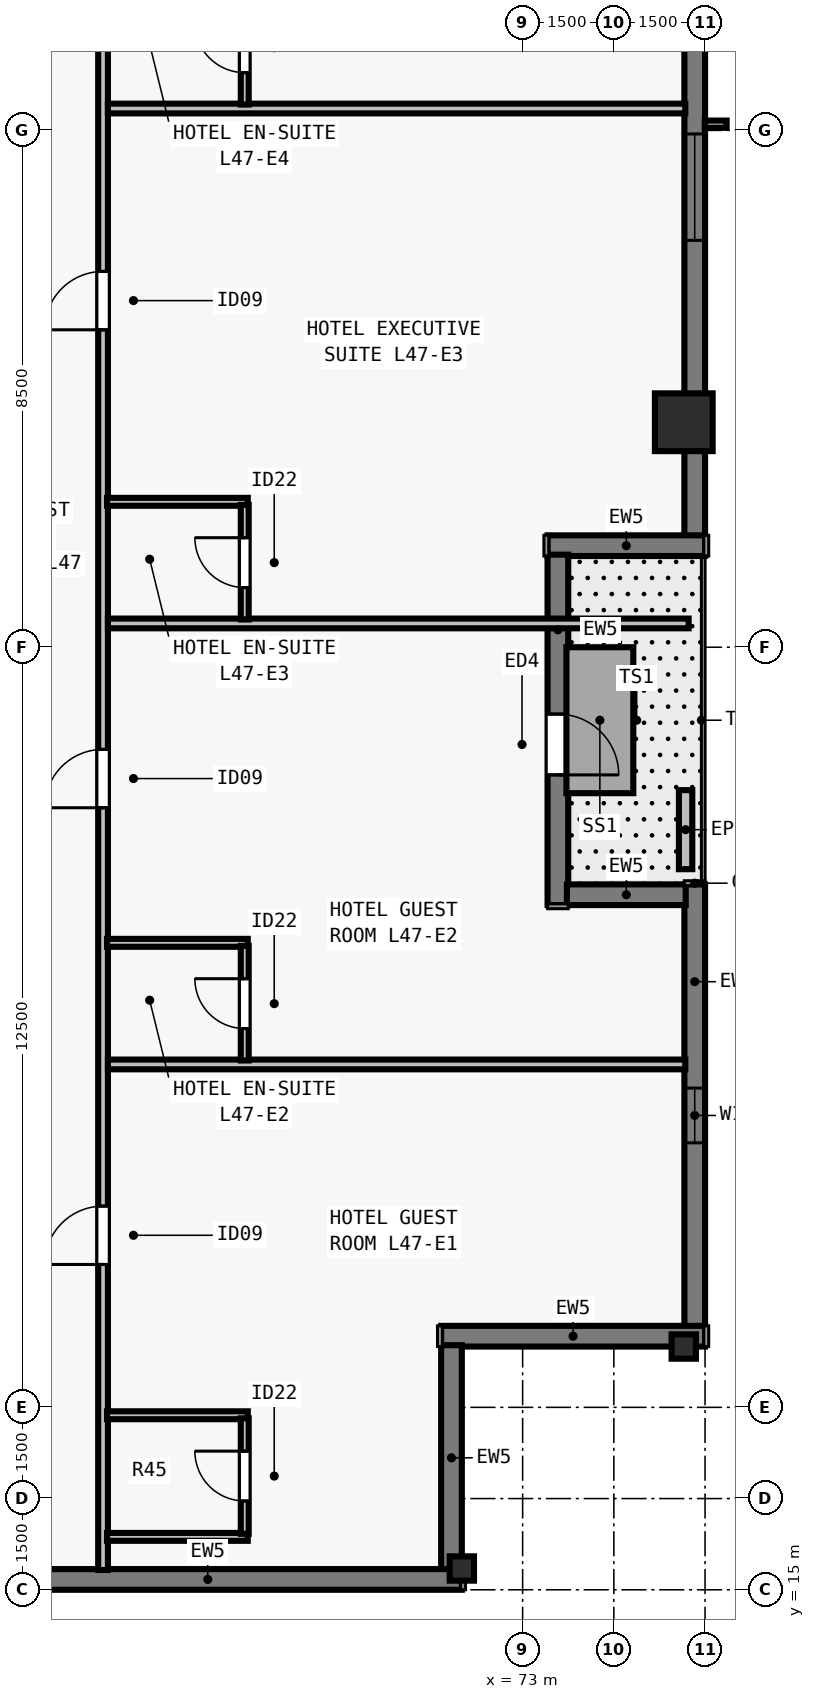
"""IFC4 building model, lengths in metres.
Left out: names, types, materials, properties, quantities, classifications, styles, units other than length and angle.
Written with IfcOpenShell. Run it as: python <this file> out.ifc"""

import sys

from ifc_helpers import new_model, si_unit, direction, frame, frame_2d, origin, origin_2d, place, context, subcontext, project, spatial, rectangle, i_section, extrude, element, fill, save


model = new_model("IFC4")
c1 = context("Model", 3, precision=1e-05, world=origin(), true_north=direction((0.0, 1.0)))
c2 = subcontext(c1, "Body", "Model", "MODEL_VIEW")
j1 = project(units=[si_unit("LENGTHUNIT", "METRE"), si_unit("PLANEANGLEUNIT", "RADIAN")], contexts=[c1])
p1 = place(None, origin())
s1 = spatial("IfcSite", under=j1, at=p1, CompositionType="ELEMENT")
p2 = place(p1, origin())
s2 = spatial("IfcBuilding", under=s1, at=p2, CompositionType="ELEMENT")
p3 = place(p2, frame((0.0, 0.0, 172.5)))
s3 = spatial("IfcBuildingStorey", under=s2, at=p3, CompositionType="ELEMENT", Elevation=172.5)
for number, where, z_axis, x_axis in (
    (1, (72.0, 15.35, 0.0), (0.0, 0.0, 1.0), (1.0, 0.0, 0.0)),
    (2, (75.65, 19.0, 0.0), (0.0, 0.0, 1.0), (0.0, 1.0, 0.0)),
):
    element("IfcColumn", number, at=place(p3, frame(where, z_axis=z_axis, x_axis=x_axis)), inside=s3, PredefinedType="COLUMN", context=c2, shape_type="SweptSolid", body=[
        extrude(i_section(OverallWidth=0.4, OverallDepth=0.4, WebThickness=0.022, FlangeThickness=0.036, at=origin_2d()), origin(), (0.0, 0.0, 1.0), 3.5),
    ])
p4 = place(p3, frame((75.65, 34.2, 0.0), z_axis=(0.0, 0.0, 1.0), x_axis=(0.0, 1.0, 0.0)))
e3 = element("IfcColumn", 3, at=p4, inside=s3, PredefinedType="COLUMN", context=c2, shape_type="SweptSolid", body=[
    extrude(rectangle(XDim=0.95, YDim=0.95, at=origin_2d()), origin(), (0.0, 0.0, 1.0), 3.5),
])
p5 = place(p3, frame((75.83, 26.6, 0.0), z_axis=(0.0, 0.0, 1.0), x_axis=(0.0, -1.0, 0.0)))
e4 = element("IfcWall", 4, at=p5, inside=s3, PredefinedType="SOLIDWALL", context=c2, shape_type="SweptSolid", body=[
    extrude(rectangle(XDim=7.282, YDim=0.34, at=frame_2d((3.641, 0.0))), origin(), (0.0, 0.0, 1.0), 3.28),
])
p6 = place(p5, frame((3.35, 0.0, 0.8)))
e5 = element("IfcOpeningElement", 5, at=p6, cuts=e4, PredefinedType="OPENING", context=c2, shape_type="SweptSolid", body=[
    extrude(rectangle(XDim=0.9, YDim=1.66, at=frame_2d((0.45, 0.83))), frame((0.0, 0.18, 0.0), z_axis=(0.0, -1.0, 0.0), x_axis=(1.0, 0.0, 0.0)), (0.0, 0.0, 1.0), 0.36),
])
p7 = place(p3, frame((76.0, 19.17, 0.0), z_axis=(0.0, 0.0, 1.0), x_axis=(-1.0, 0.0, 0.0)))
e6 = element("IfcWall", 6, at=p7, inside=s3, PredefinedType="SOLIDWALL", context=c2, shape_type="SweptSolid", body=[
    extrude(rectangle(XDim=4.34, YDim=0.34, at=frame_2d((2.17, 0.0))), origin(), (0.0, 0.0, 1.0), 3.28),
])
p8 = place(p3, frame((71.83, 19.022, 0.0), z_axis=(0.0, 0.0, 1.0), x_axis=(0.0, -1.0, 0.0)))
e7 = element("IfcWall", 7, at=p8, inside=s3, PredefinedType="SOLIDWALL", context=c2, shape_type="SweptSolid", body=[
    extrude(rectangle(XDim=3.704, YDim=0.34, at=frame_2d((1.852, 0.0))), origin(), (0.0, 0.0, 1.0), 3.28),
])
p9 = place(p3, frame((72.0, 15.17, 0.0), z_axis=(0.0, 0.0, 1.0), x_axis=(-1.0, 0.0, 0.0)))
e8 = element("IfcWall", 8, at=p9, inside=s3, PredefinedType="SOLIDWALL", context=c2, shape_type="SweptSolid", body=[
    extrude(rectangle(XDim=39.682, YDim=0.34, at=frame_2d((19.841, 0.0))), origin(), (0.0, 0.0, 1.0), 3.28),
])
p10 = place(p9, frame((8.505, 0.0, 0.8)))
e9 = element("IfcOpeningElement", 9, at=p10, cuts=e8, PredefinedType="OPENING", context=c2, shape_type="SweptSolid", body=[
    extrude(rectangle(XDim=1.35, YDim=1.66, at=frame_2d((0.675, 0.83))), frame((0.0, 0.18, 0.0), z_axis=(0.0, -1.0, 0.0), x_axis=(1.0, 0.0, 0.0)), (0.0, 0.0, 1.0), 0.36),
])
p11 = place(p9, frame((11.859, 0.0, 0.8)))
e10 = element("IfcOpeningElement", 10, at=p11, cuts=e8, PredefinedType="OPENING", context=c2, shape_type="SweptSolid", body=[
    extrude(rectangle(XDim=1.75, YDim=1.66, at=frame_2d((0.875, 0.83))), frame((0.0, 0.18, 0.0), z_axis=(0.0, -1.0, 0.0), x_axis=(1.0, 0.0, 0.0)), (0.0, 0.0, 1.0), 0.36),
])
p12 = place(p9, frame((16.062, 0.0, 0.8)))
e11 = element("IfcOpeningElement", 11, at=p12, cuts=e8, PredefinedType="OPENING", context=c2, shape_type="SweptSolid", body=[
    extrude(rectangle(XDim=1.35, YDim=1.66, at=frame_2d((0.675, 0.83))), frame((0.0, 0.18, 0.0), z_axis=(0.0, -1.0, 0.0), x_axis=(1.0, 0.0, 0.0)), (0.0, 0.0, 1.0), 0.36),
])
p13 = place(p9, frame((18.966, 0.0, 0.8)))
e12 = element("IfcOpeningElement", 12, at=p13, cuts=e8, PredefinedType="OPENING", context=c2, shape_type="SweptSolid", body=[
    extrude(rectangle(XDim=1.75, YDim=1.66, at=frame_2d((0.875, 0.83))), frame((0.0, 0.18, 0.0), z_axis=(0.0, -1.0, 0.0), x_axis=(1.0, 0.0, 0.0)), (0.0, 0.0, 1.0), 0.36),
])
p14 = place(p9, frame((21.469, 0.0, 0.8)))
e13 = element("IfcOpeningElement", 13, at=p14, cuts=e8, PredefinedType="OPENING", context=c2, shape_type="SweptSolid", body=[
    extrude(rectangle(XDim=1.35, YDim=1.66, at=frame_2d((0.675, 0.83))), frame((0.0, 0.18, 0.0), z_axis=(0.0, -1.0, 0.0), x_axis=(1.0, 0.0, 0.0)), (0.0, 0.0, 1.0), 0.36),
])
p15 = place(p9, frame((26.073, 0.0, 0.8)))
e14 = element("IfcOpeningElement", 14, at=p15, cuts=e8, PredefinedType="OPENING", context=c2, shape_type="SweptSolid", body=[
    extrude(rectangle(XDim=1.75, YDim=1.66, at=frame_2d((0.875, 0.83))), frame((0.0, 0.18, 0.0), z_axis=(0.0, -1.0, 0.0), x_axis=(1.0, 0.0, 0.0)), (0.0, 0.0, 1.0), 0.36),
])
p16 = place(p9, frame((32.71, 0.0, 0.8)))
e15 = element("IfcOpeningElement", 15, at=p16, cuts=e8, PredefinedType="OPENING", context=c2, shape_type="SweptSolid", body=[
    extrude(rectangle(XDim=0.9, YDim=1.66, at=frame_2d((0.45, 0.83))), frame((0.0, 0.18, 0.0), z_axis=(0.0, -1.0, 0.0), x_axis=(1.0, 0.0, 0.0)), (0.0, 0.0, 1.0), 0.36),
])
p17 = place(p3, frame((75.83, 59.0, 0.0), z_axis=(0.0, 0.0, 1.0), x_axis=(0.0, -1.0, 0.0)))
e16 = element("IfcWall", 16, at=p17, inside=s3, PredefinedType="SOLIDWALL", context=c2, shape_type="SweptSolid", body=[
    extrude(rectangle(XDim=26.682, YDim=0.34, at=frame_2d((13.341, 0.0))), origin(), (0.0, 0.0, 1.0), 3.28),
])
p18 = place(p17, frame((4.873, 0.0, 0.8)))
e17 = element("IfcOpeningElement", 17, at=p18, cuts=e16, PredefinedType="OPENING", context=c2, shape_type="SweptSolid", body=[
    extrude(rectangle(XDim=1.75, YDim=1.66, at=frame_2d((0.875, 0.83))), frame((0.0, 0.18, 0.0), z_axis=(0.0, -1.0, 0.0), x_axis=(1.0, 0.0, 0.0)), (0.0, 0.0, 1.0), 0.36),
])
p19 = place(p17, frame((8.87, 0.0, 0.8)))
e18 = element("IfcOpeningElement", 18, at=p19, cuts=e16, PredefinedType="OPENING", context=c2, shape_type="SweptSolid", body=[
    extrude(rectangle(XDim=1.35, YDim=1.66, at=frame_2d((0.675, 0.83))), frame((0.0, 0.18, 0.0), z_axis=(0.0, -1.0, 0.0), x_axis=(1.0, 0.0, 0.0)), (0.0, 0.0, 1.0), 0.36),
])
p20 = place(p17, frame((16.462, 0.0, 0.8)))
e19 = element("IfcOpeningElement", 19, at=p20, cuts=e16, PredefinedType="OPENING", context=c2, shape_type="SweptSolid", body=[
    extrude(rectangle(XDim=1.35, YDim=1.66, at=frame_2d((0.675, 0.83))), frame((0.0, 0.18, 0.0), z_axis=(0.0, -1.0, 0.0), x_axis=(1.0, 0.0, 0.0)), (0.0, 0.0, 1.0), 0.36),
])
p21 = place(p17, frame((20.059, 0.0, 0.8)))
e20 = element("IfcOpeningElement", 20, at=p21, cuts=e16, PredefinedType="OPENING", context=c2, shape_type="SweptSolid", body=[
    extrude(rectangle(XDim=1.75, YDim=1.66, at=frame_2d((0.875, 0.83))), frame((0.0, 0.18, 0.0), z_axis=(0.0, -1.0, 0.0), x_axis=(1.0, 0.0, 0.0)), (0.0, 0.0, 1.0), 0.36),
])
p22 = place(p3, frame((76.0, 32.17, 0.0), z_axis=(0.0, 0.0, 1.0), x_axis=(-1.0, 0.0, 0.0)))
e21 = element("IfcWall", 21, at=p22, inside=s3, PredefinedType="SOLIDWALL", context=c2, shape_type="SweptSolid", body=[
    extrude(rectangle(XDim=2.59, YDim=0.34, at=frame_2d((1.295, 0.0))), origin(), (0.0, 0.0, 1.0), 3.28),
])
p23 = place(p3, frame((73.58, 32.022, 0.0), z_axis=(0.0, 0.0, 1.0), x_axis=(0.0, -1.0, 0.0)))
e22 = element("IfcWall", 22, at=p23, inside=s3, PredefinedType="SOLIDWALL", context=c2, shape_type="SweptSolid", body=[
    extrude(rectangle(XDim=5.762, YDim=0.34, at=frame_2d((2.881, 0.0))), origin(), (0.0, 0.0, 1.0), 3.28),
])
p24 = place(p23, frame((2.621, 0.0, 0.0)))
e23 = element("IfcOpeningElement", 23, at=p24, cuts=e22, PredefinedType="OPENING", context=c2, shape_type="SweptSolid", body=[
    extrude(rectangle(XDim=1.0, YDim=2.15, at=frame_2d((0.5, 1.075))), frame((0.0, 0.18, 0.0), z_axis=(0.0, -1.0, 0.0), x_axis=(1.0, 0.0, 0.0)), (0.0, 0.0, 1.0), 0.36),
])
p25 = place(p3, frame((73.728, 26.43, 0.0), z_axis=(0.0, 0.0, 1.0), x_axis=(1.0, 0.0, 0.0)))
e24 = element("IfcWall", 24, at=p25, inside=s3, PredefinedType="SOLIDWALL", context=c2, shape_type="SweptSolid", body=[
    extrude(rectangle(XDim=1.954, YDim=0.34, at=frame_2d((0.977, 0.0))), origin(), (0.0, 0.0, 1.0), 3.28),
])
p26 = place(p3, frame((75.68, 26.85, 0.0), z_axis=(0.0, 0.0, 1.0), x_axis=(0.0, 1.0, 0.0)))
e25 = element("IfcWall", 25, at=p26, inside=s3, PredefinedType="PARAPET", context=c2, shape_type="SweptSolid", body=[
    extrude(rectangle(XDim=1.3, YDim=0.22, at=frame_2d((0.65, 0.0))), origin(), (0.0, 0.0, 1.0), 0.55),
])
p27 = place(p3, frame((66.1, 15.325, 0.0), z_axis=(0.0, 0.0, 1.0), x_axis=(0.0, 1.0, 0.0)))
e26 = element("IfcWall", 26, at=p27, inside=s3, PredefinedType="PARTITIONING", context=c2, shape_type="SweptSolid", body=[
    extrude(rectangle(XDim=47.35, YDim=0.16, at=frame_2d((23.675, 0.0))), origin(), (0.0, 0.0, 1.0), 2.555),
])
p28 = place(p27, frame((5.025, 0.0, 0.0)))
e27 = element("IfcOpeningElement", 27, at=p28, cuts=e26, PredefinedType="OPENING", context=c2, shape_type="SweptSolid", body=[
    extrude(rectangle(XDim=0.96, YDim=2.15, at=frame_2d((0.48, 1.075))), frame((0.0, 0.09, 0.0), z_axis=(0.0, -1.0, 0.0), x_axis=(1.0, 0.0, 0.0)), (0.0, 0.0, 1.0), 0.18),
])
p29 = place(p27, frame((12.535, 0.0, 0.0)))
e28 = element("IfcOpeningElement", 28, at=p29, cuts=e26, PredefinedType="OPENING", context=c2, shape_type="SweptSolid", body=[
    extrude(rectangle(XDim=0.96, YDim=2.15, at=frame_2d((0.48, 1.075))), frame((0.0, 0.09, 0.0), z_axis=(0.0, -1.0, 0.0), x_axis=(1.0, 0.0, 0.0)), (0.0, 0.0, 1.0), 0.18),
])
p30 = place(p27, frame((20.395, 0.0, 0.0)))
e29 = element("IfcOpeningElement", 29, at=p30, cuts=e26, PredefinedType="OPENING", context=c2, shape_type="SweptSolid", body=[
    extrude(rectangle(XDim=0.96, YDim=2.15, at=frame_2d((0.48, 1.075))), frame((0.0, 0.09, 0.0), z_axis=(0.0, -1.0, 0.0), x_axis=(1.0, 0.0, 0.0)), (0.0, 0.0, 1.0), 0.18),
])
p31 = place(p27, frame((28.255, 0.0, 0.0)))
e30 = element("IfcOpeningElement", 30, at=p31, cuts=e26, PredefinedType="OPENING", context=c2, shape_type="SweptSolid", body=[
    extrude(rectangle(XDim=0.96, YDim=2.15, at=frame_2d((0.48, 1.075))), frame((0.0, 0.09, 0.0), z_axis=(0.0, -1.0, 0.0), x_axis=(1.0, 0.0, 0.0)), (0.0, 0.0, 1.0), 0.18),
])
p32 = place(p27, frame((36.115, 0.0, 0.0)))
e31 = element("IfcOpeningElement", 31, at=p32, cuts=e26, PredefinedType="OPENING", context=c2, shape_type="SweptSolid", body=[
    extrude(rectangle(XDim=0.96, YDim=2.15, at=frame_2d((0.48, 1.075))), frame((0.0, 0.09, 0.0), z_axis=(0.0, -1.0, 0.0), x_axis=(1.0, 0.0, 0.0)), (0.0, 0.0, 1.0), 0.18),
])
p33 = place(p27, frame((44.1, 0.0, 0.0)))
e32 = element("IfcOpeningElement", 32, at=p33, cuts=e26, PredefinedType="OPENING", context=c2, shape_type="SweptSolid", body=[
    extrude(rectangle(XDim=0.96, YDim=2.15, at=frame_2d((0.48, 1.075))), frame((0.0, 0.09, 0.0), z_axis=(0.0, -1.0, 0.0), x_axis=(1.0, 0.0, 0.0)), (0.0, 0.0, 1.0), 0.18),
])
for number, where, z_axis, x_axis in (
    (33, (66.165, 15.87, 0.0), (0.0, 0.0, 1.0), (1.0, 0.0, 0.0)),
    (34, (66.165, 17.87, 0.0), (0.0, 0.0, 1.0), (1.0, 0.0, 0.0)),
):
    element("IfcWall", number, at=place(p3, frame(where, z_axis=z_axis, x_axis=x_axis)), inside=s3, PredefinedType="PLUMBINGWALL", context=c2, shape_type="SweptSolid", body=[
        extrude(rectangle(XDim=2.315, YDim=0.13, at=frame_2d((1.157, 0.0))), origin(), (0.0, 0.0, 1.0), 3.28),
    ])
p34 = place(p3, frame((68.43, 15.92, 0.0), z_axis=(0.0, 0.0, 1.0), x_axis=(0.0, 1.0, 0.0)))
e35 = element("IfcWall", 35, at=p34, inside=s3, PredefinedType="PLUMBINGWALL", context=c2, shape_type="SweptSolid", body=[
    extrude(rectangle(XDim=1.9, YDim=0.13, at=frame_2d((0.95, 0.0))), origin(), (0.0, 0.0, 1.0), 3.28),
])
p35 = place(p34, frame((0.54, 0.0, 0.0)))
e36 = element("IfcOpeningElement", 36, at=p35, cuts=e35, PredefinedType="OPENING", context=c2, shape_type="SweptSolid", body=[
    extrude(rectangle(XDim=0.82, YDim=2.1, at=frame_2d((0.41, 1.05))), frame((0.0, 0.075, 0.0), z_axis=(0.0, -1.0, 0.0), x_axis=(1.0, 0.0, 0.0)), (0.0, 0.0, 1.0), 0.15),
])
p36 = place(p3, frame((66.18, 23.639, 0.0), z_axis=(0.0, 0.0, 1.0), x_axis=(1.0, 0.0, 0.0)))
e37 = element("IfcWall", 37, at=p36, inside=s3, PredefinedType="PARTITIONING", context=c2, shape_type="SweptSolid", body=[
    extrude(rectangle(XDim=9.495, YDim=0.16, at=frame_2d((4.748, 0.0))), origin(), (0.0, 0.0, 1.0), 2.896),
])
p37 = place(p3, frame((66.165, 25.639, 0.0), z_axis=(0.0, 0.0, 1.0), x_axis=(1.0, 0.0, 0.0)))
e38 = element("IfcWall", 38, at=p37, inside=s3, PredefinedType="PLUMBINGWALL", context=c2, shape_type="SweptSolid", body=[
    extrude(rectangle(XDim=2.315, YDim=0.13, at=frame_2d((1.157, 0.0))), origin(), (0.0, 0.0, 1.0), 2.896),
])
p38 = place(p3, frame((68.43, 23.704, 0.0), z_axis=(0.0, 0.0, 1.0), x_axis=(0.0, 1.0, 0.0)))
e39 = element("IfcWall", 39, at=p38, inside=s3, PredefinedType="PLUMBINGWALL", context=c2, shape_type="SweptSolid", body=[
    extrude(rectangle(XDim=1.885, YDim=0.13, at=frame_2d((0.942, 0.0))), origin(), (0.0, 0.0, 1.0), 3.28),
])
p39 = place(p38, frame((0.525, 0.0, 0.0)))
e40 = element("IfcOpeningElement", 40, at=p39, cuts=e39, PredefinedType="OPENING", context=c2, shape_type="SweptSolid", body=[
    extrude(rectangle(XDim=0.82, YDim=2.1, at=frame_2d((0.41, 1.05))), frame((0.0, 0.075, 0.0), z_axis=(0.0, -1.0, 0.0), x_axis=(1.0, 0.0, 0.0)), (0.0, 0.0, 1.0), 0.15),
])
p40 = place(p3, frame((66.18, 30.891, 0.0), z_axis=(0.0, 0.0, 1.0), x_axis=(1.0, 0.0, 0.0)))
e41 = element("IfcWall", 41, at=p40, inside=s3, PredefinedType="PARTITIONING", context=c2, shape_type="SweptSolid", body=[
    extrude(rectangle(XDim=9.55, YDim=0.16, at=frame_2d((4.775, 0.0))), origin(), (0.0, 0.0, 1.0), 3.28),
])
p41 = place(p3, frame((66.165, 32.891, 0.0), z_axis=(0.0, 0.0, 1.0), x_axis=(1.0, 0.0, 0.0)))
e42 = element("IfcWall", 42, at=p41, inside=s3, PredefinedType="PLUMBINGWALL", context=c2, shape_type="SweptSolid", body=[
    extrude(rectangle(XDim=2.315, YDim=0.13, at=frame_2d((1.157, 0.0))), origin(), (0.0, 0.0, 1.0), 3.28),
])
p42 = place(p3, frame((68.43, 30.956, 0.0), z_axis=(0.0, 0.0, 1.0), x_axis=(0.0, 1.0, 0.0)))
e43 = element("IfcWall", 43, at=p42, inside=s3, PredefinedType="PLUMBINGWALL", context=c2, shape_type="SweptSolid", body=[
    extrude(rectangle(XDim=1.885, YDim=0.13, at=frame_2d((0.942, 0.0))), origin(), (0.0, 0.0, 1.0), 3.28),
])
p43 = place(p42, frame((0.525, 0.0, 0.0)))
e44 = element("IfcOpeningElement", 44, at=p43, cuts=e43, PredefinedType="OPENING", context=c2, shape_type="SweptSolid", body=[
    extrude(rectangle(XDim=0.82, YDim=2.1, at=frame_2d((0.41, 1.05))), frame((0.0, 0.075, 0.0), z_axis=(0.0, -1.0, 0.0), x_axis=(1.0, 0.0, 0.0)), (0.0, 0.0, 1.0), 0.15),
])
p44 = place(p3, frame((66.18, 39.359, 0.0), z_axis=(0.0, 0.0, 1.0), x_axis=(1.0, 0.0, 0.0)))
e45 = element("IfcWall", 45, at=p44, inside=s3, PredefinedType="PARTITIONING", context=c2, shape_type="SweptSolid", body=[
    extrude(rectangle(XDim=9.495, YDim=0.16, at=frame_2d((4.748, 0.0))), origin(), (0.0, 0.0, 1.0), 3.28),
])
p45 = place(p3, frame((68.43, 39.424, 0.0), z_axis=(0.0, 0.0, 1.0), x_axis=(0.0, 1.0, 0.0)))
e46 = element("IfcWall", 46, at=p45, inside=s3, PredefinedType="PLUMBINGWALL", context=c2, shape_type="SweptSolid", body=[
    extrude(rectangle(XDim=1.885, YDim=0.13, at=frame_2d((0.942, 0.0))), origin(), (0.0, 0.0, 1.0), 3.28),
])
p46 = place(p45, frame((0.525, 0.0, 0.0)))
e47 = element("IfcOpeningElement", 47, at=p46, cuts=e46, PredefinedType="OPENING", context=c2, shape_type="SweptSolid", body=[
    extrude(rectangle(XDim=0.82, YDim=2.1, at=frame_2d((0.41, 1.05))), frame((0.0, 0.075, 0.0), z_axis=(0.0, -1.0, 0.0), x_axis=(1.0, 0.0, 0.0)), (0.0, 0.0, 1.0), 0.15),
])
p47 = place(p21, origin())
e48 = element("IfcWindow", 48, at=p47, inside=s3, PartitioningType="SINGLE_PANEL", PredefinedType="WINDOW", context=c2, shape_type="SweptSolid", body=[
    extrude(rectangle(XDim=1.75, YDim=1.66, at=frame_2d((0.875, 0.83))), frame((0.0, -0.05, 0.0), z_axis=(0.0, -1.0, 0.0), x_axis=(1.0, 0.0, 0.0)), (0.0, 0.0, 1.0), 0.06),
])
fill(e20, e48)
p48 = place(p24, origin())
e49 = element("IfcDoor", 49, at=p48, inside=s3, OperationType="SINGLE_SWING_RIGHT", PredefinedType="DOOR", context=c2, shape_type="SweptSolid", body=[
    extrude(rectangle(XDim=1.0, YDim=2.15, at=frame_2d((0.5, 1.075))), frame((0.0, 0.025, 0.0), z_axis=(0.0, -1.0, 0.0), x_axis=(1.0, 0.0, 0.0)), (0.0, 0.0, 1.0), 0.05),
])
fill(e23, e49)
p49 = place(p6, origin())
e50 = element("IfcWindow", 50, at=p49, inside=s3, PartitioningType="SINGLE_PANEL", PredefinedType="WINDOW", context=c2, shape_type="SweptSolid", body=[
    extrude(rectangle(XDim=0.9, YDim=1.66, at=frame_2d((0.45, 0.83))), frame((0.0, -0.04, 0.0), z_axis=(0.0, -1.0, 0.0), x_axis=(1.0, 0.0, 0.0)), (0.0, 0.0, 1.0), 0.06),
])
fill(e5, e50)
p50 = place(p35, origin())
e51 = element("IfcDoor", 51, at=p50, inside=s3, OperationType="SINGLE_SWING_RIGHT", PredefinedType="DOOR", context=c2, shape_type="SweptSolid", body=[
    extrude(rectangle(XDim=0.82, YDim=2.1, at=frame_2d((0.41, 1.05))), frame((0.0, 0.025, 0.0), z_axis=(0.0, -1.0, 0.0), x_axis=(1.0, 0.0, 0.0)), (0.0, 0.0, 1.0), 0.05),
])
fill(e36, e51)
p51 = place(p28, origin())
e52 = element("IfcDoor", 52, at=p51, inside=s3, OperationType="SINGLE_SWING_LEFT", PredefinedType="DOOR", context=c2, shape_type="SweptSolid", body=[
    extrude(rectangle(XDim=0.96, YDim=2.15, at=frame_2d((0.48, 1.075))), frame((0.0, 0.025, 0.0), z_axis=(0.0, -1.0, 0.0), x_axis=(1.0, 0.0, 0.0)), (0.0, 0.0, 1.0), 0.05),
])
fill(e27, e52)
p52 = place(p39, origin())
e53 = element("IfcDoor", 53, at=p52, inside=s3, OperationType="SINGLE_SWING_RIGHT", PredefinedType="DOOR", context=c2, shape_type="SweptSolid", body=[
    extrude(rectangle(XDim=0.82, YDim=2.1, at=frame_2d((0.41, 1.05))), frame((0.0, 0.025, 0.0), z_axis=(0.0, -1.0, 0.0), x_axis=(1.0, 0.0, 0.0)), (0.0, 0.0, 1.0), 0.05),
])
fill(e40, e53)
p53 = place(p29, origin())
e54 = element("IfcDoor", 54, at=p53, inside=s3, OperationType="SINGLE_SWING_LEFT", PredefinedType="DOOR", context=c2, shape_type="SweptSolid", body=[
    extrude(rectangle(XDim=0.96, YDim=2.15, at=frame_2d((0.48, 1.075))), frame((0.0, 0.025, 0.0), z_axis=(0.0, -1.0, 0.0), x_axis=(1.0, 0.0, 0.0)), (0.0, 0.0, 1.0), 0.05),
])
fill(e28, e54)
p54 = place(p43, origin())
e55 = element("IfcDoor", 55, at=p54, inside=s3, OperationType="SINGLE_SWING_RIGHT", PredefinedType="DOOR", context=c2, shape_type="SweptSolid", body=[
    extrude(rectangle(XDim=0.82, YDim=2.1, at=frame_2d((0.41, 1.05))), frame((0.0, 0.025, 0.0), z_axis=(0.0, -1.0, 0.0), x_axis=(1.0, 0.0, 0.0)), (0.0, 0.0, 1.0), 0.05),
])
fill(e44, e55)
p55 = place(p30, origin())
e56 = element("IfcDoor", 56, at=p55, inside=s3, OperationType="SINGLE_SWING_LEFT", PredefinedType="DOOR", context=c2, shape_type="SweptSolid", body=[
    extrude(rectangle(XDim=0.96, YDim=2.15, at=frame_2d((0.48, 1.075))), frame((0.0, 0.025, 0.0), z_axis=(0.0, -1.0, 0.0), x_axis=(1.0, 0.0, 0.0)), (0.0, 0.0, 1.0), 0.05),
])
fill(e29, e56)
p56 = place(p46, origin())
e57 = element("IfcDoor", 57, at=p56, inside=s3, OperationType="SINGLE_SWING_RIGHT", PredefinedType="DOOR", context=c2, shape_type="SweptSolid", body=[
    extrude(rectangle(XDim=0.82, YDim=2.1, at=frame_2d((0.41, 1.05))), frame((0.0, 0.025, 0.0), z_axis=(0.0, -1.0, 0.0), x_axis=(1.0, 0.0, 0.0)), (0.0, 0.0, 1.0), 0.05),
])
fill(e47, e57)
save(model, sys.argv[1])
